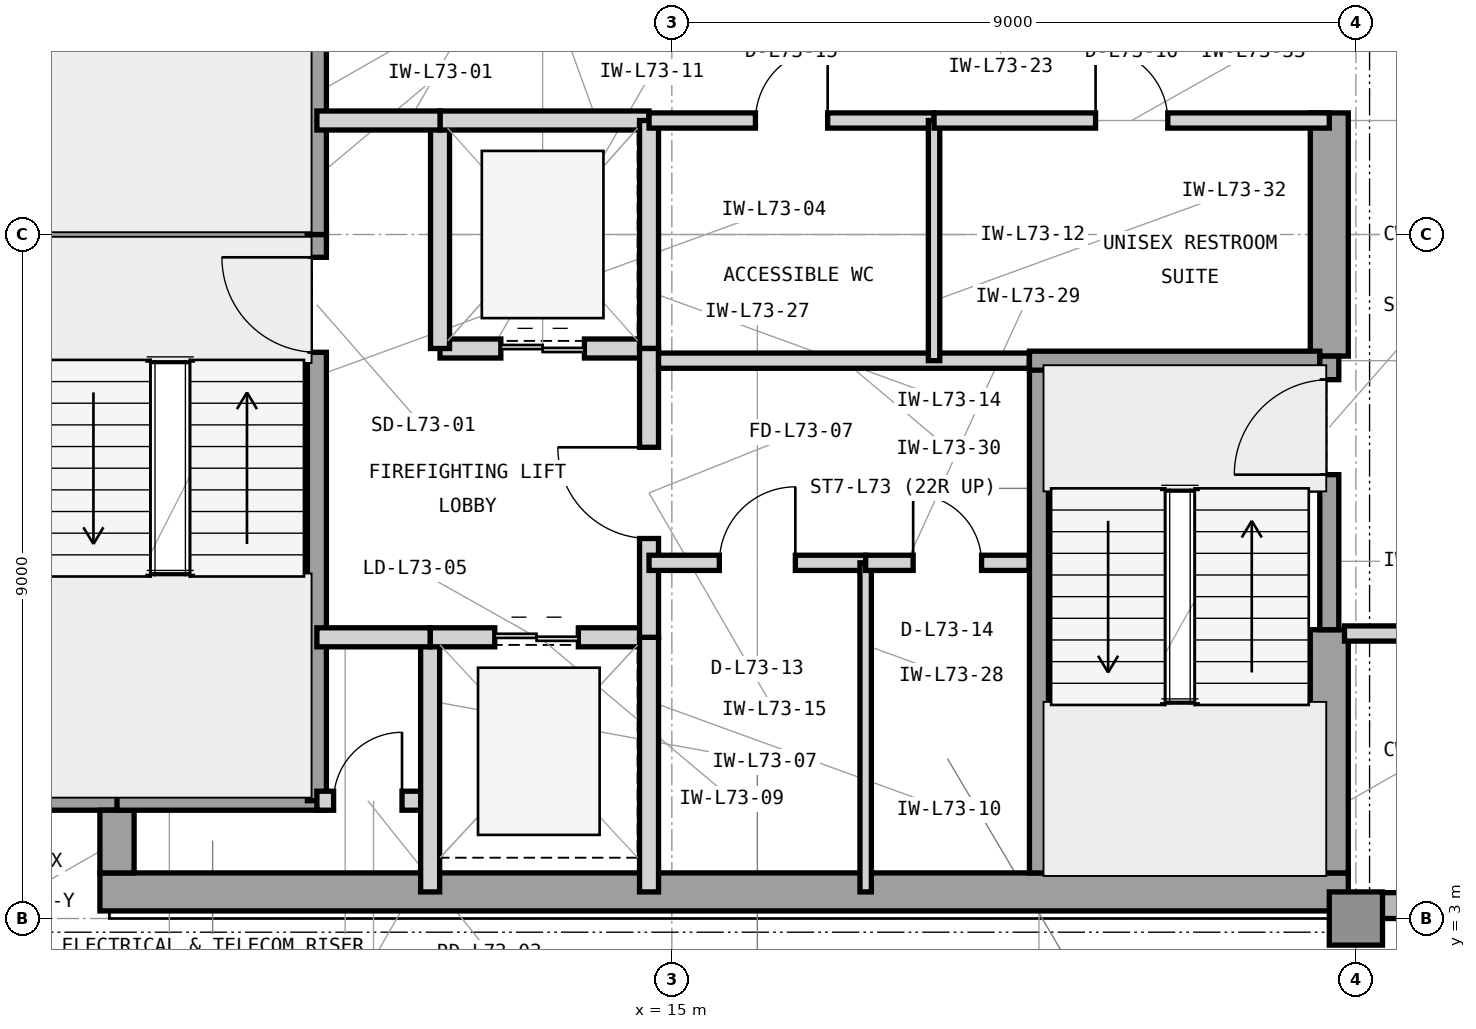
"""IFC4 building model, lengths in metres.
Left out: names, types, materials, properties, quantities, classifications, styles, units other than length and angle.
Written with IfcOpenShell. Run it as: python <this file> out.ifc"""

import sys

from ifc_helpers import new_model, si_unit, direction, frame, frame_2d, origin, origin_2d, place, context, subcontext, project, spatial, rectangle, extrude, element, fill, save


model = new_model("IFC4")
c1 = context("Model", 3, precision=1e-05, world=origin(), true_north=direction((0.0, 1.0)))
c2 = subcontext(c1, "Body", "Model", "MODEL_VIEW")
j1 = project(units=[si_unit("LENGTHUNIT", "METRE"), si_unit("PLANEANGLEUNIT", "RADIAN")], contexts=[c1])
p1 = place(None, origin())
s1 = spatial("IfcSite", under=j1, at=p1, CompositionType="ELEMENT")
p2 = place(p1, origin())
s2 = spatial("IfcBuilding", under=s1, at=p2, CompositionType="ELEMENT")
p3 = place(p2, frame((0.0, 0.0, 297.6)))
s3 = spatial("IfcBuildingStorey", under=s2, at=p3, CompositionType="ELEMENT", Elevation=297.6)
p4 = place(p3, frame((7.475, 3.35, 0.0), z_axis=(0.0, 0.0, 1.0), x_axis=(1.0, 0.0, 0.0)))
e1 = element("IfcWall", 1, at=p4, inside=s3, PredefinedType="SHEAR", context=c2, shape_type="SweptSolid", body=[
    extrude(rectangle(XDim=16.425, YDim=0.5, at=frame_2d((8.212, 0.0))), origin(), (0.0, 0.0, 1.0), 3.9),
])
p5 = place(p3, frame((23.65, 3.6, 0.0), z_axis=(0.0, 0.0, 1.0), x_axis=(0.0, 1.0, 0.0)))
e2 = element("IfcWall", 2, at=p5, inside=s3, PredefinedType="SHEAR", context=c2, shape_type="SweptSolid", body=[
    extrude(rectangle(XDim=3.2, YDim=0.5, at=frame_2d((1.6, 0.0))), origin(), (0.0, 0.0, 1.0), 3.9),
])
p6 = place(p3, frame((23.65, 10.4, 0.0), z_axis=(0.0, 0.0, 1.0), x_axis=(0.0, 1.0, 0.0)))
e3 = element("IfcWall", 3, at=p6, inside=s3, PredefinedType="SHEAR", context=c2, shape_type="SweptSolid", body=[
    extrude(rectangle(XDim=3.2, YDim=0.5, at=frame_2d((1.6, 0.0))), origin(), (0.0, 0.0, 1.0), 3.9),
])
p7 = place(p3, frame((6.6, 4.65, 0.0), z_axis=(0.0, 0.0, 1.0), x_axis=(1.0, 0.0, 0.0)))
e4 = element("IfcWall", 4, at=p7, inside=s3, PredefinedType="SHEAR", context=c2, shape_type="SweptSolid", body=[
    extrude(rectangle(XDim=1.325, YDim=0.45, at=frame_2d((0.663, 0.0))), origin(), (0.0, 0.0, 1.0), 3.9),
])
p8 = place(p3, frame((7.7, 3.6, 0.0), z_axis=(0.0, 0.0, 1.0), x_axis=(0.0, 1.0, 0.0)))
e5 = element("IfcWall", 5, at=p8, inside=s3, PredefinedType="SHEAR", context=c2, shape_type="SweptSolid", body=[
    extrude(rectangle(XDim=0.825, YDim=0.45, at=frame_2d((0.413, 0.0))), origin(), (0.0, 0.0, 1.0), 3.9),
])
p9 = place(p3, frame((24.0, 3.0, 0.0), z_axis=(0.0, 0.0, 1.0), x_axis=(1.0, 0.0, 0.0)))
e6 = element("IfcColumn", 6, at=p9, inside=s3, PredefinedType="COLUMN", context=c2, shape_type="SweptSolid", body=[
    extrude(rectangle(XDim=0.7, YDim=0.7, at=origin_2d()), origin(), (0.0, 0.0, 1.0), 3.9),
])
p10 = place(p3, frame((23.9, 3.17, 0.0), z_axis=(0.0, 0.0, 1.0), x_axis=(1.0, 0.0, 0.0)))
e7 = element("IfcWall", 7, at=p10, inside=s3, PredefinedType="STANDARD", context=c2, shape_type="SweptSolid", body=[
    extrude(rectangle(XDim=25.5, YDim=0.34, at=frame_2d((12.75, 0.0))), origin(), (0.0, 0.0, 1.0), 3.715),
])
p11 = place(p10, frame((0.8, 0.0, 0.8)))
e8 = element("IfcOpeningElement", 8, at=p11, cuts=e7, PredefinedType="OPENING", context=c2, shape_type="SweptSolid", body=[
    extrude(rectangle(XDim=1.9, YDim=2.35, at=frame_2d((0.95, 1.175))), frame((0.0, 0.18, 0.0), z_axis=(0.0, -1.0, 0.0), x_axis=(1.0, 0.0, 0.0)), (0.0, 0.0, 1.0), 0.36),
])
p12 = place(p10, frame((10.075, 0.0, 0.8)))
e9 = element("IfcOpeningElement", 9, at=p12, cuts=e7, PredefinedType="OPENING", context=c2, shape_type="SweptSolid", body=[
    extrude(rectangle(XDim=2.6, YDim=2.35, at=frame_2d((1.3, 1.175))), frame((0.0, 0.18, 0.0), z_axis=(0.0, -1.0, 0.0), x_axis=(1.0, 0.0, 0.0)), (0.0, 0.0, 1.0), 0.36),
])
p13 = place(p10, frame((14.525, 0.0, 0.8)))
e10 = element("IfcOpeningElement", 10, at=p13, cuts=e7, PredefinedType="OPENING", context=c2, shape_type="SweptSolid", body=[
    extrude(rectangle(XDim=2.6, YDim=2.35, at=frame_2d((1.3, 1.175))), frame((0.0, 0.18, 0.0), z_axis=(0.0, -1.0, 0.0), x_axis=(1.0, 0.0, 0.0)), (0.0, 0.0, 1.0), 0.36),
])
p14 = place(p3, frame((6.35, 12.0, 0.0), z_axis=(0.0, 0.0, 1.0), x_axis=(1.0, 0.0, 0.0)))
e11 = element("IfcWall", 11, at=p14, inside=s3, PredefinedType="SHEAR", context=c2, shape_type="SweptSolid", body=[
    extrude(rectangle(XDim=4.105, YDim=0.25, at=frame_2d((2.052, 0.0))), origin(), (0.0, 0.0, 1.0), 3.9),
])
p15 = place(p3, frame((7.7, 4.55, 0.0), z_axis=(0.0, 0.0, 1.0), x_axis=(1.0, 0.0, 0.0)))
e12 = element("IfcWall", 12, at=p15, inside=s3, PredefinedType="SHEAR", context=c2, shape_type="SweptSolid", body=[
    extrude(rectangle(XDim=2.755, YDim=0.25, at=frame_2d((1.377, 0.0))), origin(), (0.0, 0.0, 1.0), 3.9),
])
p16 = place(p3, frame((10.33, 4.55, 0.0), z_axis=(0.0, 0.0, 1.0), x_axis=(0.0, 1.0, 0.0)))
e13 = element("IfcWall", 13, at=p16, inside=s3, PredefinedType="SHEAR", context=c2, shape_type="SweptSolid", body=[
    extrude(rectangle(XDim=7.45, YDim=0.25, at=frame_2d((3.725, 0.0))), origin(), (0.0, 0.0, 1.0), 3.9),
])
p17 = place(p16, frame((5.9, 0.0, 0.0)))
e14 = element("IfcOpeningElement", 14, at=p17, cuts=e13, PredefinedType="OPENING", context=c2, shape_type="SweptSolid", body=[
    extrude(rectangle(XDim=1.25, YDim=2.2, at=frame_2d((0.625, 1.1))), frame((0.0, 0.135, 0.0), z_axis=(0.0, -1.0, 0.0), x_axis=(1.0, 0.0, 0.0)), (0.0, 0.0, 1.0), 0.27),
])
p18 = place(p3, frame((10.33, 12.0, 0.0), z_axis=(0.0, 0.0, 1.0), x_axis=(0.0, 1.0, 0.0)))
e15 = element("IfcWall", 15, at=p18, inside=s3, PredefinedType="SHEAR", context=c2, shape_type="SweptSolid", body=[
    extrude(rectangle(XDim=7.45, YDim=0.25, at=frame_2d((3.725, 0.0))), origin(), (0.0, 0.0, 1.0), 3.9),
])
p19 = place(p18, frame((5.85, 0.0, 0.0)))
e16 = element("IfcOpeningElement", 16, at=p19, cuts=e15, PredefinedType="OPENING", context=c2, shape_type="SweptSolid", body=[
    extrude(rectangle(XDim=1.25, YDim=2.2, at=frame_2d((0.625, 1.1))), frame((0.0, 0.135, 0.0), z_axis=(0.0, -1.0, 0.0), x_axis=(1.0, 0.0, 0.0)), (0.0, 0.0, 1.0), 0.27),
])
p20 = place(p3, frame((10.33, 4.55, 0.0), z_axis=(0.0, 0.0, 1.0), x_axis=(1.0, 0.0, 0.0)))
e17 = element("IfcWall", 17, at=p20, inside=s3, PredefinedType="PARTITIONING", context=c2, shape_type="SweptSolid", body=[
    extrude(rectangle(XDim=1.49, YDim=0.25, at=frame_2d((0.745, 0.0))), origin(), (0.0, 0.0, 1.0), 3.705),
])
p21 = place(p20, frame((0.22, 0.0, 0.0)))
e18 = element("IfcOpeningElement", 18, at=p21, cuts=e17, PredefinedType="OPENING", context=c2, shape_type="SweptSolid", body=[
    extrude(rectangle(XDim=0.9, YDim=2.1, at=frame_2d((0.45, 1.05))), frame((0.0, 0.135, 0.0), z_axis=(0.0, -1.0, 0.0), x_axis=(1.0, 0.0, 0.0)), (0.0, 0.0, 1.0), 0.27),
])
p22 = place(p3, frame((11.82, 3.35, 0.0), z_axis=(0.0, 0.0, 1.0), x_axis=(0.0, 1.0, 0.0)))
e19 = element("IfcWall", 19, at=p22, inside=s3, PredefinedType="PARTITIONING", context=c2, shape_type="SweptSolid", body=[
    extrude(rectangle(XDim=3.35, YDim=0.25, at=frame_2d((1.675, 0.0))), origin(), (0.0, 0.0, 1.0), 3.705),
])
p23 = place(p3, frame((11.82, 6.7, 0.0), z_axis=(0.0, 0.0, 1.0), x_axis=(1.0, 0.0, 0.0)))
e20 = element("IfcWall", 20, at=p23, inside=s3, PredefinedType="PARTITIONING", context=c2, shape_type="SweptSolid", body=[
    extrude(rectangle(XDim=2.88, YDim=0.25, at=frame_2d((1.44, 0.0))), origin(), (0.0, 0.0, 1.0), 3.354),
])
p24 = place(p23, frame((0.85, 0.0, 0.0)))
e21 = element("IfcOpeningElement", 21, at=p24, cuts=e20, PredefinedType="OPENING", context=c2, shape_type="SweptSolid", body=[
    extrude(rectangle(XDim=1.1, YDim=2.25, at=frame_2d((0.55, 1.125))), frame((0.0, 0.135, 0.0), z_axis=(0.0, -1.0, 0.0), x_axis=(1.0, 0.0, 0.0)), (0.0, 0.0, 1.0), 0.27),
])
p25 = place(p3, frame((14.7, 3.35, 0.0), z_axis=(0.0, 0.0, 1.0), x_axis=(0.0, 1.0, 0.0)))
e22 = element("IfcWall", 22, at=p25, inside=s3, PredefinedType="PARTITIONING", context=c2, shape_type="SweptSolid", body=[
    extrude(rectangle(XDim=3.35, YDim=0.25, at=frame_2d((1.675, 0.0))), origin(), (0.0, 0.0, 1.0), 3.705),
])
p26 = place(p3, frame((11.95, 10.5, 0.0), z_axis=(0.0, 0.0, 1.0), x_axis=(1.0, 0.0, 0.0)))
e23 = element("IfcWall", 23, at=p26, inside=s3, PredefinedType="PARTITIONING", context=c2, shape_type="SweptSolid", body=[
    extrude(rectangle(XDim=2.75, YDim=0.25, at=frame_2d((1.375, 0.0))), origin(), (0.0, 0.0, 1.0), 3.354),
])
p27 = place(p26, frame((0.8, 0.0, 0.0)))
e24 = element("IfcOpeningElement", 24, at=p27, cuts=e23, PredefinedType="OPENING", context=c2, shape_type="SweptSolid", body=[
    extrude(rectangle(XDim=1.1, YDim=2.25, at=frame_2d((0.55, 1.125))), frame((0.0, 0.135, 0.0), z_axis=(0.0, -1.0, 0.0), x_axis=(1.0, 0.0, 0.0)), (0.0, 0.0, 1.0), 0.27),
])
p28 = place(p3, frame((11.95, 10.5, 0.0), z_axis=(0.0, 0.0, 1.0), x_axis=(0.0, 1.0, 0.0)))
e25 = element("IfcWall", 25, at=p28, inside=s3, PredefinedType="PARTITIONING", context=c2, shape_type="SweptSolid", body=[
    extrude(rectangle(XDim=3.0, YDim=0.25, at=frame_2d((1.5, 0.0))), origin(), (0.0, 0.0, 1.0), 3.705),
])
p29 = place(p3, frame((11.95, 13.5, 0.0), z_axis=(0.0, 0.0, 1.0), x_axis=(1.0, 0.0, 0.0)))
e26 = element("IfcWall", 26, at=p29, inside=s3, PredefinedType="PARTITIONING", context=c2, shape_type="SweptSolid", body=[
    extrude(rectangle(XDim=2.75, YDim=0.25, at=frame_2d((1.375, 0.0))), origin(), (0.0, 0.0, 1.0), 3.354),
])
p30 = place(p3, frame((14.7, 10.5, 0.0), z_axis=(0.0, 0.0, 1.0), x_axis=(0.0, 1.0, 0.0)))
e27 = element("IfcWall", 27, at=p30, inside=s3, PredefinedType="PARTITIONING", context=c2, shape_type="SweptSolid", body=[
    extrude(rectangle(XDim=3.0, YDim=0.25, at=frame_2d((1.5, 0.0))), origin(), (0.0, 0.0, 1.0), 3.705),
])
p31 = place(p3, frame((14.7, 6.7, 0.0), z_axis=(0.0, 0.0, 1.0), x_axis=(0.0, 1.0, 0.0)))
e28 = element("IfcWall", 28, at=p31, inside=s3, PredefinedType="PARTITIONING", context=c2, shape_type="SweptSolid", body=[
    extrude(rectangle(XDim=3.8, YDim=0.25, at=frame_2d((1.9, 0.0))), origin(), (0.0, 0.0, 1.0), 3.705),
])
p32 = place(p31, frame((1.3, 0.0, 0.0)))
e29 = element("IfcOpeningElement", 29, at=p32, cuts=e28, PredefinedType="OPENING", context=c2, shape_type="SweptSolid", body=[
    extrude(rectangle(XDim=1.2, YDim=2.2, at=frame_2d((0.6, 1.1))), frame((0.0, 0.135, 0.0), z_axis=(0.0, -1.0, 0.0), x_axis=(1.0, 0.0, 0.0)), (0.0, 0.0, 1.0), 0.27),
])
p33 = place(p3, frame((10.33, 13.5, 0.0), z_axis=(0.0, 0.0, 1.0), x_axis=(1.0, 0.0, 0.0)))
e30 = element("IfcWall", 30, at=p33, inside=s3, PredefinedType="PARTITIONING", context=c2, shape_type="SweptSolid", body=[
    extrude(rectangle(XDim=1.62, YDim=0.25, at=frame_2d((0.81, 0.0))), origin(), (0.0, 0.0, 1.0), 3.354),
])
p34 = place(p3, frame((10.33, 6.7, 0.0), z_axis=(0.0, 0.0, 1.0), x_axis=(1.0, 0.0, 0.0)))
e31 = element("IfcWall", 31, at=p34, inside=s3, PredefinedType="PARTITIONING", context=c2, shape_type="SweptSolid", body=[
    extrude(rectangle(XDim=1.49, YDim=0.25, at=frame_2d((0.745, 0.0))), origin(), (0.0, 0.0, 1.0), 3.354),
])
p35 = place(p3, frame((14.7, 7.68, 0.0), z_axis=(0.0, 0.0, 1.0), x_axis=(1.0, 0.0, 0.0)))
e32 = element("IfcWall", 32, at=p35, inside=s3, PredefinedType="PARTITIONING", context=c2, shape_type="SweptSolid", body=[
    extrude(rectangle(XDim=2.85, YDim=0.2, at=frame_2d((1.425, 0.0))), origin(), (0.0, 0.0, 1.0), 3.705),
])
p36 = place(p35, frame((0.925, 0.0, 0.0)))
e33 = element("IfcOpeningElement", 33, at=p36, cuts=e32, PredefinedType="OPENING", context=c2, shape_type="SweptSolid", body=[
    extrude(rectangle(XDim=1.0, YDim=2.15, at=frame_2d((0.5, 1.075))), frame((0.0, 0.11, 0.0), z_axis=(0.0, -1.0, 0.0), x_axis=(1.0, 0.0, 0.0)), (0.0, 0.0, 1.0), 0.22),
])
p37 = place(p3, frame((17.55, 3.35, 0.0), z_axis=(0.0, 0.0, 1.0), x_axis=(0.0, 1.0, 0.0)))
e34 = element("IfcWall", 34, at=p37, inside=s3, PredefinedType="PARTITIONING", context=c2, shape_type="SweptSolid", body=[
    extrude(rectangle(XDim=4.33, YDim=0.15, at=frame_2d((2.165, 0.0))), origin(), (0.0, 0.0, 1.0), 3.705),
])
p38 = place(p3, frame((17.55, 7.68, 0.0), z_axis=(0.0, 0.0, 1.0), x_axis=(1.0, 0.0, 0.0)))
e35 = element("IfcWall", 35, at=p38, inside=s3, PredefinedType="PARTITIONING", context=c2, shape_type="SweptSolid", body=[
    extrude(rectangle(XDim=2.15, YDim=0.2, at=frame_2d((1.075, 0.0))), origin(), (0.0, 0.0, 1.0), 3.705),
])
p39 = place(p38, frame((0.625, 0.0, 0.0)))
e36 = element("IfcOpeningElement", 36, at=p39, cuts=e35, PredefinedType="OPENING", context=c2, shape_type="SweptSolid", body=[
    extrude(rectangle(XDim=0.9, YDim=2.1, at=frame_2d((0.45, 1.05))), frame((0.0, 0.11, 0.0), z_axis=(0.0, -1.0, 0.0), x_axis=(1.0, 0.0, 0.0)), (0.0, 0.0, 1.0), 0.22),
])
p40 = place(p3, frame((14.825, 10.34, 0.0), z_axis=(0.0, 0.0, 1.0), x_axis=(1.0, 0.0, 0.0)))
e37 = element("IfcWall", 37, at=p40, inside=s3, PredefinedType="PARTITIONING", context=c2, shape_type="SweptSolid", body=[
    extrude(rectangle(XDim=4.88, YDim=0.2, at=frame_2d((2.44, 0.0))), origin(), (0.0, 0.0, 1.0), 3.705),
])
p41 = place(p3, frame((14.7, 13.5, 0.0), z_axis=(0.0, 0.0, 1.0), x_axis=(1.0, 0.0, 0.0)))
e38 = element("IfcWall", 38, at=p41, inside=s3, PredefinedType="PARTITIONING", context=c2, shape_type="SweptSolid", body=[
    extrude(rectangle(XDim=3.75, YDim=0.2, at=frame_2d((1.875, 0.0))), origin(), (0.0, 0.0, 1.0), 3.354),
])
p42 = place(p41, frame((1.4, 0.0, 0.0)))
e39 = element("IfcOpeningElement", 39, at=p42, cuts=e38, PredefinedType="OPENING", context=c2, shape_type="SweptSolid", body=[
    extrude(rectangle(XDim=0.95, YDim=2.1, at=frame_2d((0.475, 1.05))), frame((0.0, 0.11, 0.0), z_axis=(0.0, -1.0, 0.0), x_axis=(1.0, 0.0, 0.0)), (0.0, 0.0, 1.0), 0.22),
])
p43 = place(p3, frame((18.45, 10.34, 0.0), z_axis=(0.0, 0.0, 1.0), x_axis=(0.0, 1.0, 0.0)))
e40 = element("IfcWall", 40, at=p43, inside=s3, PredefinedType="PARTITIONING", context=c2, shape_type="SweptSolid", body=[
    extrude(rectangle(XDim=3.16, YDim=0.15, at=frame_2d((1.58, 0.0))), origin(), (0.0, 0.0, 1.0), 3.705),
])
p44 = place(p3, frame((18.45, 13.5, 0.0), z_axis=(0.0, 0.0, 1.0), x_axis=(1.0, 0.0, 0.0)))
e41 = element("IfcWall", 41, at=p44, inside=s3, PredefinedType="PARTITIONING", context=c2, shape_type="SweptSolid", body=[
    extrude(rectangle(XDim=5.2, YDim=0.2, at=frame_2d((2.6, 0.0))), origin(), (0.0, 0.0, 1.0), 3.354),
])
p45 = place(p44, frame((2.125, 0.0, 0.0)))
e42 = element("IfcOpeningElement", 42, at=p45, cuts=e41, PredefinedType="OPENING", context=c2, shape_type="SweptSolid", body=[
    extrude(rectangle(XDim=0.95, YDim=2.1, at=frame_2d((0.475, 1.05))), frame((0.0, 0.11, 0.0), z_axis=(0.0, -1.0, 0.0), x_axis=(1.0, 0.0, 0.0)), (0.0, 0.0, 1.0), 0.22),
])
p46 = place(p3, frame((23.85, 6.75, 0.0), z_axis=(0.0, 0.0, 1.0), x_axis=(1.0, 0.0, 0.0)))
e43 = element("IfcWall", 43, at=p46, inside=s3, PredefinedType="PARTITIONING", context=c2, shape_type="SweptSolid", body=[
    extrude(rectangle(XDim=3.05, YDim=0.2, at=frame_2d((1.525, 0.0))), origin(), (0.0, 0.0, 1.0), 3.705),
])
p47 = place(p46, frame((0.9, 0.0, 0.0)))
e44 = element("IfcOpeningElement", 44, at=p47, cuts=e43, PredefinedType="OPENING", context=c2, shape_type="SweptSolid", body=[
    extrude(rectangle(XDim=1.0, YDim=2.15, at=frame_2d((0.5, 1.075))), frame((0.0, 0.11, 0.0), z_axis=(0.0, -1.0, 0.0), x_axis=(1.0, 0.0, 0.0)), (0.0, 0.0, 1.0), 0.22),
])
p48 = place(p3, frame((19.83, 3.6, 0.0), z_axis=(0.0, 0.0, 1.0), x_axis=(0.0, 1.0, 0.0)))
e45 = element("IfcWall", 45, at=p48, inside=s3, PredefinedType="SHEAR", context=c2, shape_type="SweptSolid", body=[
    extrude(rectangle(XDim=6.74, YDim=0.25, at=frame_2d((3.37, 0.0))), origin(), (0.0, 0.0, 1.0), 3.9),
])
p49 = place(p3, frame((19.705, 10.34, 0.0), z_axis=(0.0, 0.0, 1.0), x_axis=(1.0, 0.0, 0.0)))
e46 = element("IfcWall", 46, at=p49, inside=s3, PredefinedType="SHEAR", context=c2, shape_type="SweptSolid", body=[
    extrude(rectangle(XDim=3.82, YDim=0.25, at=frame_2d((1.91, 0.0))), origin(), (0.0, 0.0, 1.0), 3.9),
])
p50 = place(p3, frame((23.65, 6.8, 0.0), z_axis=(0.0, 0.0, 1.0), x_axis=(0.0, 1.0, 0.0)))
e47 = element("IfcWall", 47, at=p50, inside=s3, PredefinedType="SHEAR", context=c2, shape_type="SweptSolid", body=[
    extrude(rectangle(XDim=3.6, YDim=0.25, at=frame_2d((1.8, 0.0))), origin(), (0.0, 0.0, 1.0), 3.9),
])
p51 = place(p50, frame((2.04, 0.0, 0.0)))
e48 = element("IfcOpeningElement", 48, at=p51, cuts=e47, PredefinedType="OPENING", context=c2, shape_type="SweptSolid", body=[
    extrude(rectangle(XDim=1.25, YDim=2.2, at=frame_2d((0.625, 1.1))), frame((0.0, 0.135, 0.0), z_axis=(0.0, -1.0, 0.0), x_axis=(1.0, 0.0, 0.0)), (0.0, 0.0, 1.0), 0.27),
])
p52 = place(p17, origin())
e49 = element("IfcDoor", 49, at=p52, inside=s3, OperationType="SINGLE_SWING_RIGHT", PredefinedType="DOOR", context=c2, shape_type="SweptSolid", body=[
    extrude(rectangle(XDim=1.25, YDim=2.2, at=frame_2d((0.625, 1.1))), frame((0.0, 0.025, 0.0), z_axis=(0.0, -1.0, 0.0), x_axis=(1.0, 0.0, 0.0)), (0.0, 0.0, 1.0), 0.05),
])
fill(e14, e49)
p53 = place(p21, origin())
e50 = element("IfcDoor", 50, at=p53, inside=s3, OperationType="SINGLE_SWING_RIGHT", PredefinedType="TRAPDOOR", context=c2, shape_type="SweptSolid", body=[
    extrude(rectangle(XDim=0.9, YDim=2.1, at=frame_2d((0.45, 1.05))), frame((0.0, 0.025, 0.0), z_axis=(0.0, -1.0, 0.0), x_axis=(1.0, 0.0, 0.0)), (0.0, 0.0, 1.0), 0.05),
])
fill(e18, e50)
p54 = place(p24, origin())
e51 = element("IfcDoor", 51, at=p54, inside=s3, OperationType="DOUBLE_DOOR_SLIDING", PredefinedType="DOOR", context=c2, shape_type="SweptSolid", body=[
    extrude(rectangle(XDim=1.1, YDim=2.25, at=frame_2d((0.55, 1.125))), frame((0.0, 0.025, 0.0), z_axis=(0.0, -1.0, 0.0), x_axis=(1.0, 0.0, 0.0)), (0.0, 0.0, 1.0), 0.05),
])
fill(e21, e51)
p55 = place(p27, origin())
e52 = element("IfcDoor", 52, at=p55, inside=s3, OperationType="DOUBLE_DOOR_SLIDING", PredefinedType="DOOR", context=c2, shape_type="SweptSolid", body=[
    extrude(rectangle(XDim=1.1, YDim=2.25, at=frame_2d((0.55, 1.125))), frame((0.0, 0.025, 0.0), z_axis=(0.0, -1.0, 0.0), x_axis=(1.0, 0.0, 0.0)), (0.0, 0.0, 1.0), 0.05),
])
fill(e24, e52)
p56 = place(p32, origin())
e53 = element("IfcDoor", 53, at=p56, inside=s3, OperationType="SINGLE_SWING_RIGHT", PredefinedType="DOOR", context=c2, shape_type="SweptSolid", body=[
    extrude(rectangle(XDim=1.2, YDim=2.2, at=frame_2d((0.6, 1.1))), frame((0.0, 0.025, 0.0), z_axis=(0.0, -1.0, 0.0), x_axis=(1.0, 0.0, 0.0)), (0.0, 0.0, 1.0), 0.05),
])
fill(e29, e53)
p57 = place(p36, origin())
e54 = element("IfcDoor", 54, at=p57, inside=s3, OperationType="SINGLE_SWING_RIGHT", PredefinedType="DOOR", context=c2, shape_type="SweptSolid", body=[
    extrude(rectangle(XDim=1.0, YDim=2.15, at=frame_2d((0.5, 1.075))), frame((0.0, 0.025, 0.0), z_axis=(0.0, -1.0, 0.0), x_axis=(1.0, 0.0, 0.0)), (0.0, 0.0, 1.0), 0.05),
])
fill(e33, e54)
p58 = place(p39, origin())
e55 = element("IfcDoor", 55, at=p58, inside=s3, OperationType="SINGLE_SWING_LEFT", PredefinedType="TRAPDOOR", context=c2, shape_type="SweptSolid", body=[
    extrude(rectangle(XDim=0.9, YDim=2.1, at=frame_2d((0.45, 1.05))), frame((0.0, 0.025, 0.0), z_axis=(0.0, -1.0, 0.0), x_axis=(1.0, 0.0, 0.0)), (0.0, 0.0, 1.0), 0.05),
])
fill(e36, e55)
p59 = place(p42, origin())
e56 = element("IfcDoor", 56, at=p59, inside=s3, OperationType="SINGLE_SWING_RIGHT", PredefinedType="DOOR", context=c2, shape_type="SweptSolid", body=[
    extrude(rectangle(XDim=0.95, YDim=2.1, at=frame_2d((0.475, 1.05))), frame((0.0, 0.025, 0.0), z_axis=(0.0, -1.0, 0.0), x_axis=(1.0, 0.0, 0.0)), (0.0, 0.0, 1.0), 0.05),
])
fill(e39, e56)
p60 = place(p45, origin())
e57 = element("IfcDoor", 57, at=p60, inside=s3, OperationType="SINGLE_SWING_LEFT", PredefinedType="DOOR", context=c2, shape_type="SweptSolid", body=[
    extrude(rectangle(XDim=0.95, YDim=2.1, at=frame_2d((0.475, 1.05))), frame((0.0, 0.025, 0.0), z_axis=(0.0, -1.0, 0.0), x_axis=(1.0, 0.0, 0.0)), (0.0, 0.0, 1.0), 0.05),
])
fill(e42, e57)
p61 = place(p51, origin())
e58 = element("IfcDoor", 58, at=p61, inside=s3, OperationType="SINGLE_SWING_LEFT", PredefinedType="DOOR", context=c2, shape_type="SweptSolid", body=[
    extrude(rectangle(XDim=1.25, YDim=2.2, at=frame_2d((0.625, 1.1))), frame((0.0, 0.025, 0.0), z_axis=(0.0, -1.0, 0.0), x_axis=(1.0, 0.0, 0.0)), (0.0, 0.0, 1.0), 0.05),
])
fill(e48, e58)
save(model, sys.argv[1])
